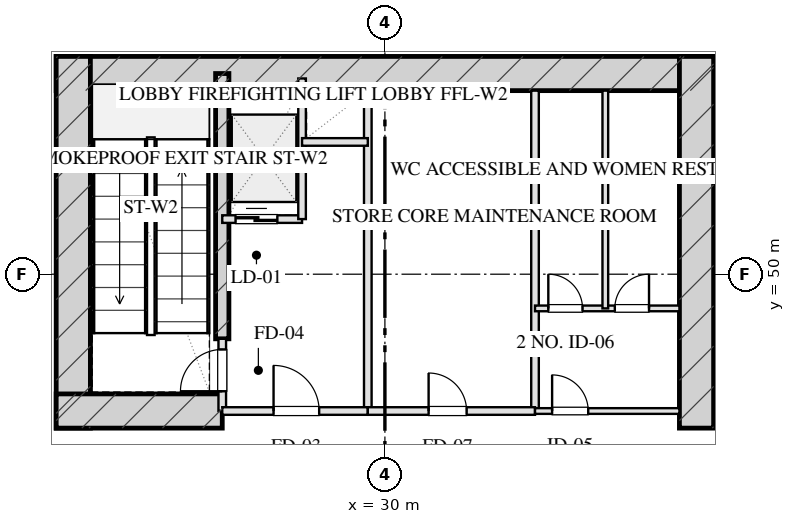
"""IFC4 building model, lengths in metres.
Left out: names, types, materials, properties, quantities, classifications, styles, units other than length and angle.
Written with IfcOpenShell. Run it as: python <this file> out.ifc"""

import sys

from ifc_helpers import new_model, si_unit, direction, frame, frame_2d, origin, place, context, subcontext, project, spatial, rectangle, extrude, element, fill, save


model = new_model("IFC4")
c1 = context("Model", 3, precision=1e-05, world=origin(), true_north=direction((0.0, 1.0)))
c2 = subcontext(c1, "Body", "Model", "MODEL_VIEW")
j1 = project(units=[si_unit("LENGTHUNIT", "METRE"), si_unit("PLANEANGLEUNIT", "RADIAN")], contexts=[c1])
p1 = place(None, origin())
s1 = spatial("IfcSite", under=j1, at=p1, CompositionType="ELEMENT")
p2 = place(p1, origin())
s2 = spatial("IfcBuilding", under=s1, at=p2, CompositionType="ELEMENT")
p3 = place(p2, frame((0.0, 0.0, -6.0)))
s3 = spatial("IfcBuildingStorey", under=s2, at=p3, CompositionType="ELEMENT", Elevation=-6.0)
p4 = place(p3, frame((21.35, 55.28, 0.0), z_axis=(0.0, 0.0, 1.0), x_axis=(1.0, 0.0, 0.0)))
e1 = element("IfcWall", 1, at=p4, inside=s3, PredefinedType="SHEAR", context=c2, shape_type="SweptSolid", body=[
    extrude(rectangle(XDim=17.3, YDim=0.9, at=frame_2d((8.65, 0.0))), origin(), (0.0, 0.0, 1.0), 6.0),
])
for number, where, z_axis, x_axis in (
    (2, (21.8, 45.95, 0.0), (0.0, 0.0, 1.0), (0.0, 1.0, 0.0)),
    (3, (38.2, 45.95, 0.0), (0.0, 0.0, 1.0), (0.0, 1.0, 0.0)),
):
    element("IfcWall", number, at=place(p3, frame(where, z_axis=z_axis, x_axis=x_axis)), inside=s3, PredefinedType="SHEAR", context=c2, shape_type="SweptSolid", body=[
        extrude(rectangle(XDim=9.78, YDim=0.9, at=frame_2d((4.89, 0.0))), origin(), (0.0, 0.0, 1.0), 6.0),
    ])
p5 = place(p3, frame((25.72, 48.3, 0.0), z_axis=(0.0, 0.0, 1.0), x_axis=(0.0, 1.0, 0.0)))
e4 = element("IfcWall", 4, at=p5, inside=s3, PredefinedType="SHEAR", context=c2, shape_type="SweptSolid", body=[
    extrude(rectangle(XDim=6.98, YDim=0.35, at=frame_2d((3.49, 0.0))), origin(), (0.0, 0.0, 1.0), 6.0),
])
p6 = place(p3, frame((21.35, 46.4, 0.0), z_axis=(0.0, 0.0, 1.0), x_axis=(1.0, 0.0, 0.0)))
e5 = element("IfcWall", 5, at=p6, inside=s3, PredefinedType="SHEAR", context=c2, shape_type="SweptSolid", body=[
    extrude(rectangle(XDim=4.37, YDim=0.9, at=frame_2d((2.185, 0.0))), origin(), (0.0, 0.0, 1.0), 6.0),
])
p7 = place(p3, frame((25.72, 46.4, 0.0), z_axis=(0.0, 0.0, 1.0), x_axis=(0.0, 1.0, 0.0)))
e6 = element("IfcWall", 6, at=p7, inside=s3, PredefinedType="PARTITIONING", context=c2, shape_type="SweptSolid", body=[
    extrude(rectangle(XDim=1.9, YDim=0.2, at=frame_2d((0.95, 0.0))), origin(), (0.0, 0.0, 1.0), 5.685),
])
p8 = place(p7, frame((0.52, 0.0, 0.0)))
e7 = element("IfcOpeningElement", 7, at=p8, cuts=e6, PredefinedType="OPENING", context=c2, shape_type="SweptSolid", body=[
    extrude(rectangle(XDim=1.1, YDim=2.05, at=frame_2d((0.55, 1.025))), frame((0.0, 0.11, 0.0), z_axis=(0.0, -1.0, 0.0), x_axis=(1.0, 0.0, 0.0)), (0.0, 0.0, 1.0), 0.22),
])
p9 = place(p3, frame((29.55, 46.4, 0.0), z_axis=(0.0, 0.0, 1.0), x_axis=(0.0, 1.0, 0.0)))
e8 = element("IfcWall", 8, at=p9, inside=s3, PredefinedType="PARTITIONING", context=c2, shape_type="SweptSolid", body=[
    extrude(rectangle(XDim=8.43, YDim=0.2, at=frame_2d((4.215, 0.0))), origin(), (0.0, 0.0, 1.0), 5.685),
])
p10 = place(p3, frame((25.72, 46.4, 0.0), z_axis=(0.0, 0.0, 1.0), x_axis=(1.0, 0.0, 0.0)))
e9 = element("IfcWall", 9, at=p10, inside=s3, PredefinedType="PARTITIONING", context=c2, shape_type="SweptSolid", body=[
    extrude(rectangle(XDim=3.83, YDim=0.2, at=frame_2d((1.915, 0.0))), origin(), (0.0, 0.0, 1.0), 5.685),
])
p11 = place(p10, frame((1.35, 0.0, 0.0)))
e10 = element("IfcOpeningElement", 10, at=p11, cuts=e9, PredefinedType="OPENING", context=c2, shape_type="SweptSolid", body=[
    extrude(rectangle(XDim=1.2, YDim=2.05, at=frame_2d((0.6, 1.025))), frame((0.0, 0.11, 0.0), z_axis=(0.0, -1.0, 0.0), x_axis=(1.0, 0.0, 0.0)), (0.0, 0.0, 1.0), 0.22),
])
p12 = place(p3, frame((25.72, 51.45, 0.0), z_axis=(0.0, 0.0, 1.0), x_axis=(1.0, 0.0, 0.0)))
e11 = element("IfcWall", 11, at=p12, inside=s3, PredefinedType="PARTITIONING", context=c2, shape_type="SweptSolid", body=[
    extrude(rectangle(XDim=2.1, YDim=0.2, at=frame_2d((1.05, 0.0))), origin(), (0.0, 0.0, 1.0), 5.685),
])
p13 = place(p12, frame((0.35, 0.0, 0.0)))
e12 = element("IfcOpeningElement", 12, at=p13, cuts=e11, PredefinedType="OPENING", context=c2, shape_type="SweptSolid", body=[
    extrude(rectangle(XDim=1.1, YDim=2.05, at=frame_2d((0.55, 1.025))), frame((0.0, 0.11, 0.0), z_axis=(0.0, -1.0, 0.0), x_axis=(1.0, 0.0, 0.0)), (0.0, 0.0, 1.0), 0.22),
])
p14 = place(p3, frame((27.82, 51.45, 0.0), z_axis=(0.0, 0.0, 1.0), x_axis=(0.0, 1.0, 0.0)))
e13 = element("IfcWall", 13, at=p14, inside=s3, PredefinedType="PARTITIONING", context=c2, shape_type="SweptSolid", body=[
    extrude(rectangle(XDim=3.7, YDim=0.2, at=frame_2d((1.85, 0.0))), origin(), (0.0, 0.0, 1.0), 5.685),
])
p15 = place(p3, frame((27.82, 53.48, 0.0), z_axis=(0.0, 0.0, 1.0), x_axis=(1.0, 0.0, 0.0)))
e14 = element("IfcWall", 14, at=p15, inside=s3, PredefinedType="PARTITIONING", context=c2, shape_type="SweptSolid", body=[
    extrude(rectangle(XDim=1.73, YDim=0.2, at=frame_2d((0.865, 0.0))), origin(), (0.0, 0.0, 1.0), 5.685),
])
p16 = place(p3, frame((33.95, 46.4, 0.0), z_axis=(0.0, 0.0, 1.0), x_axis=(0.0, 1.0, 0.0)))
e15 = element("IfcWall", 15, at=p16, inside=s3, PredefinedType="PARTITIONING", context=c2, shape_type="SweptSolid", body=[
    extrude(rectangle(XDim=8.43, YDim=0.2, at=frame_2d((4.215, 0.0))), origin(), (0.0, 0.0, 1.0), 5.685),
])
p17 = place(p3, frame((29.55, 46.4, 0.0), z_axis=(0.0, 0.0, 1.0), x_axis=(1.0, 0.0, 0.0)))
e16 = element("IfcWall", 16, at=p17, inside=s3, PredefinedType="PARTITIONING", context=c2, shape_type="SweptSolid", body=[
    extrude(rectangle(XDim=4.4, YDim=0.2, at=frame_2d((2.2, 0.0))), origin(), (0.0, 0.0, 1.0), 5.685),
])
p18 = place(p17, frame((1.6, 0.0, 0.0)))
e17 = element("IfcOpeningElement", 17, at=p18, cuts=e16, PredefinedType="OPENING", context=c2, shape_type="SweptSolid", body=[
    extrude(rectangle(XDim=1.0, YDim=2.05, at=frame_2d((0.5, 1.025))), frame((0.0, 0.11, 0.0), z_axis=(0.0, -1.0, 0.0), x_axis=(1.0, 0.0, 0.0)), (0.0, 0.0, 1.0), 0.22),
])
p19 = place(p3, frame((33.95, 46.4, 0.0), z_axis=(0.0, 0.0, 1.0), x_axis=(1.0, 0.0, 0.0)))
e18 = element("IfcWall", 18, at=p19, inside=s3, PredefinedType="PARTITIONING", context=c2, shape_type="SweptSolid", body=[
    extrude(rectangle(XDim=3.8, YDim=0.15, at=frame_2d((1.9, 0.0))), origin(), (0.0, 0.0, 1.0), 5.685),
])
p20 = place(p19, frame((0.45, 0.0, 0.0)))
e19 = element("IfcOpeningElement", 19, at=p20, cuts=e18, PredefinedType="OPENING", context=c2, shape_type="SweptSolid", body=[
    extrude(rectangle(XDim=0.95, YDim=2.05, at=frame_2d((0.475, 1.025))), frame((0.0, 0.085, 0.0), z_axis=(0.0, -1.0, 0.0), x_axis=(1.0, 0.0, 0.0)), (0.0, 0.0, 1.0), 0.17),
])
p21 = place(p3, frame((33.95, 49.1, 0.0), z_axis=(0.0, 0.0, 1.0), x_axis=(1.0, 0.0, 0.0)))
e20 = element("IfcWall", 20, at=p21, inside=s3, PredefinedType="PARTITIONING", context=c2, shape_type="SweptSolid", body=[
    extrude(rectangle(XDim=3.8, YDim=0.15, at=frame_2d((1.9, 0.0))), origin(), (0.0, 0.0, 1.0), 5.685),
])
p22 = place(p21, frame((0.35, 0.0, 0.0)))
e21 = element("IfcOpeningElement", 21, at=p22, cuts=e20, PredefinedType="OPENING", context=c2, shape_type="SweptSolid", body=[
    extrude(rectangle(XDim=0.9, YDim=2.05, at=frame_2d((0.45, 1.025))), frame((0.0, 0.085, 0.0), z_axis=(0.0, -1.0, 0.0), x_axis=(1.0, 0.0, 0.0)), (0.0, 0.0, 1.0), 0.17),
])
p23 = place(p21, frame((2.1, 0.0, 0.0)))
e22 = element("IfcOpeningElement", 22, at=p23, cuts=e20, PredefinedType="OPENING", context=c2, shape_type="SweptSolid", body=[
    extrude(rectangle(XDim=0.9, YDim=2.05, at=frame_2d((0.45, 1.025))), frame((0.0, 0.085, 0.0), z_axis=(0.0, -1.0, 0.0), x_axis=(1.0, 0.0, 0.0)), (0.0, 0.0, 1.0), 0.17),
])
p24 = place(p3, frame((35.8, 49.1, 0.0), z_axis=(0.0, 0.0, 1.0), x_axis=(0.0, 1.0, 0.0)))
e23 = element("IfcWall", 23, at=p24, inside=s3, PredefinedType="PARTITIONING", context=c2, shape_type="SweptSolid", body=[
    extrude(rectangle(XDim=5.73, YDim=0.15, at=frame_2d((2.865, 0.0))), origin(), (0.0, 0.0, 1.0), 5.685),
])
p25 = place(p8, origin())
e24 = element("IfcDoor", 24, at=p25, inside=s3, OperationType="SINGLE_SWING_LEFT", PredefinedType="DOOR", context=c2, shape_type="SweptSolid", body=[
    extrude(rectangle(XDim=1.1, YDim=2.05, at=frame_2d((0.55, 1.025))), frame((0.0, 0.025, 0.0), z_axis=(0.0, -1.0, 0.0), x_axis=(1.0, 0.0, 0.0)), (0.0, 0.0, 1.0), 0.05),
])
fill(e7, e24)
p26 = place(p11, origin())
e25 = element("IfcDoor", 25, at=p26, inside=s3, OperationType="SINGLE_SWING_LEFT", PredefinedType="DOOR", context=c2, shape_type="SweptSolid", body=[
    extrude(rectangle(XDim=1.2, YDim=2.05, at=frame_2d((0.6, 1.025))), frame((0.0, 0.025, 0.0), z_axis=(0.0, -1.0, 0.0), x_axis=(1.0, 0.0, 0.0)), (0.0, 0.0, 1.0), 0.05),
])
fill(e10, e25)
p27 = place(p13, origin())
e26 = element("IfcDoor", 26, at=p27, inside=s3, OperationType="DOUBLE_DOOR_SLIDING", PredefinedType="DOOR", context=c2, shape_type="SweptSolid", body=[
    extrude(rectangle(XDim=1.1, YDim=2.05, at=frame_2d((0.55, 1.025))), frame((0.0, 0.025, 0.0), z_axis=(0.0, -1.0, 0.0), x_axis=(1.0, 0.0, 0.0)), (0.0, 0.0, 1.0), 0.05),
])
fill(e12, e26)
p28 = place(p18, origin())
e27 = element("IfcDoor", 27, at=p28, inside=s3, OperationType="SINGLE_SWING_LEFT", PredefinedType="DOOR", context=c2, shape_type="SweptSolid", body=[
    extrude(rectangle(XDim=1.0, YDim=2.05, at=frame_2d((0.5, 1.025))), frame((0.0, 0.025, 0.0), z_axis=(0.0, -1.0, 0.0), x_axis=(1.0, 0.0, 0.0)), (0.0, 0.0, 1.0), 0.05),
])
fill(e17, e27)
p29 = place(p20, origin())
e28 = element("IfcDoor", 28, at=p29, inside=s3, OperationType="SINGLE_SWING_LEFT", PredefinedType="DOOR", context=c2, shape_type="SweptSolid", body=[
    extrude(rectangle(XDim=0.95, YDim=2.05, at=frame_2d((0.475, 1.025))), frame((0.0, 0.025, 0.0), z_axis=(0.0, -1.0, 0.0), x_axis=(1.0, 0.0, 0.0)), (0.0, 0.0, 1.0), 0.05),
])
fill(e19, e28)
p30 = place(p22, origin())
e29 = element("IfcDoor", 29, at=p30, inside=s3, OperationType="SINGLE_SWING_LEFT", PredefinedType="DOOR", context=c2, shape_type="SweptSolid", body=[
    extrude(rectangle(XDim=0.9, YDim=2.05, at=frame_2d((0.45, 1.025))), frame((0.0, 0.025, 0.0), z_axis=(0.0, -1.0, 0.0), x_axis=(1.0, 0.0, 0.0)), (0.0, 0.0, 1.0), 0.05),
])
fill(e21, e29)
p31 = place(p23, origin())
e30 = element("IfcDoor", 30, at=p31, inside=s3, OperationType="SINGLE_SWING_RIGHT", PredefinedType="DOOR", context=c2, shape_type="SweptSolid", body=[
    extrude(rectangle(XDim=0.9, YDim=2.05, at=frame_2d((0.45, 1.025))), frame((0.0, 0.025, 0.0), z_axis=(0.0, -1.0, 0.0), x_axis=(1.0, 0.0, 0.0)), (0.0, 0.0, 1.0), 0.05),
])
fill(e22, e30)
save(model, sys.argv[1])
